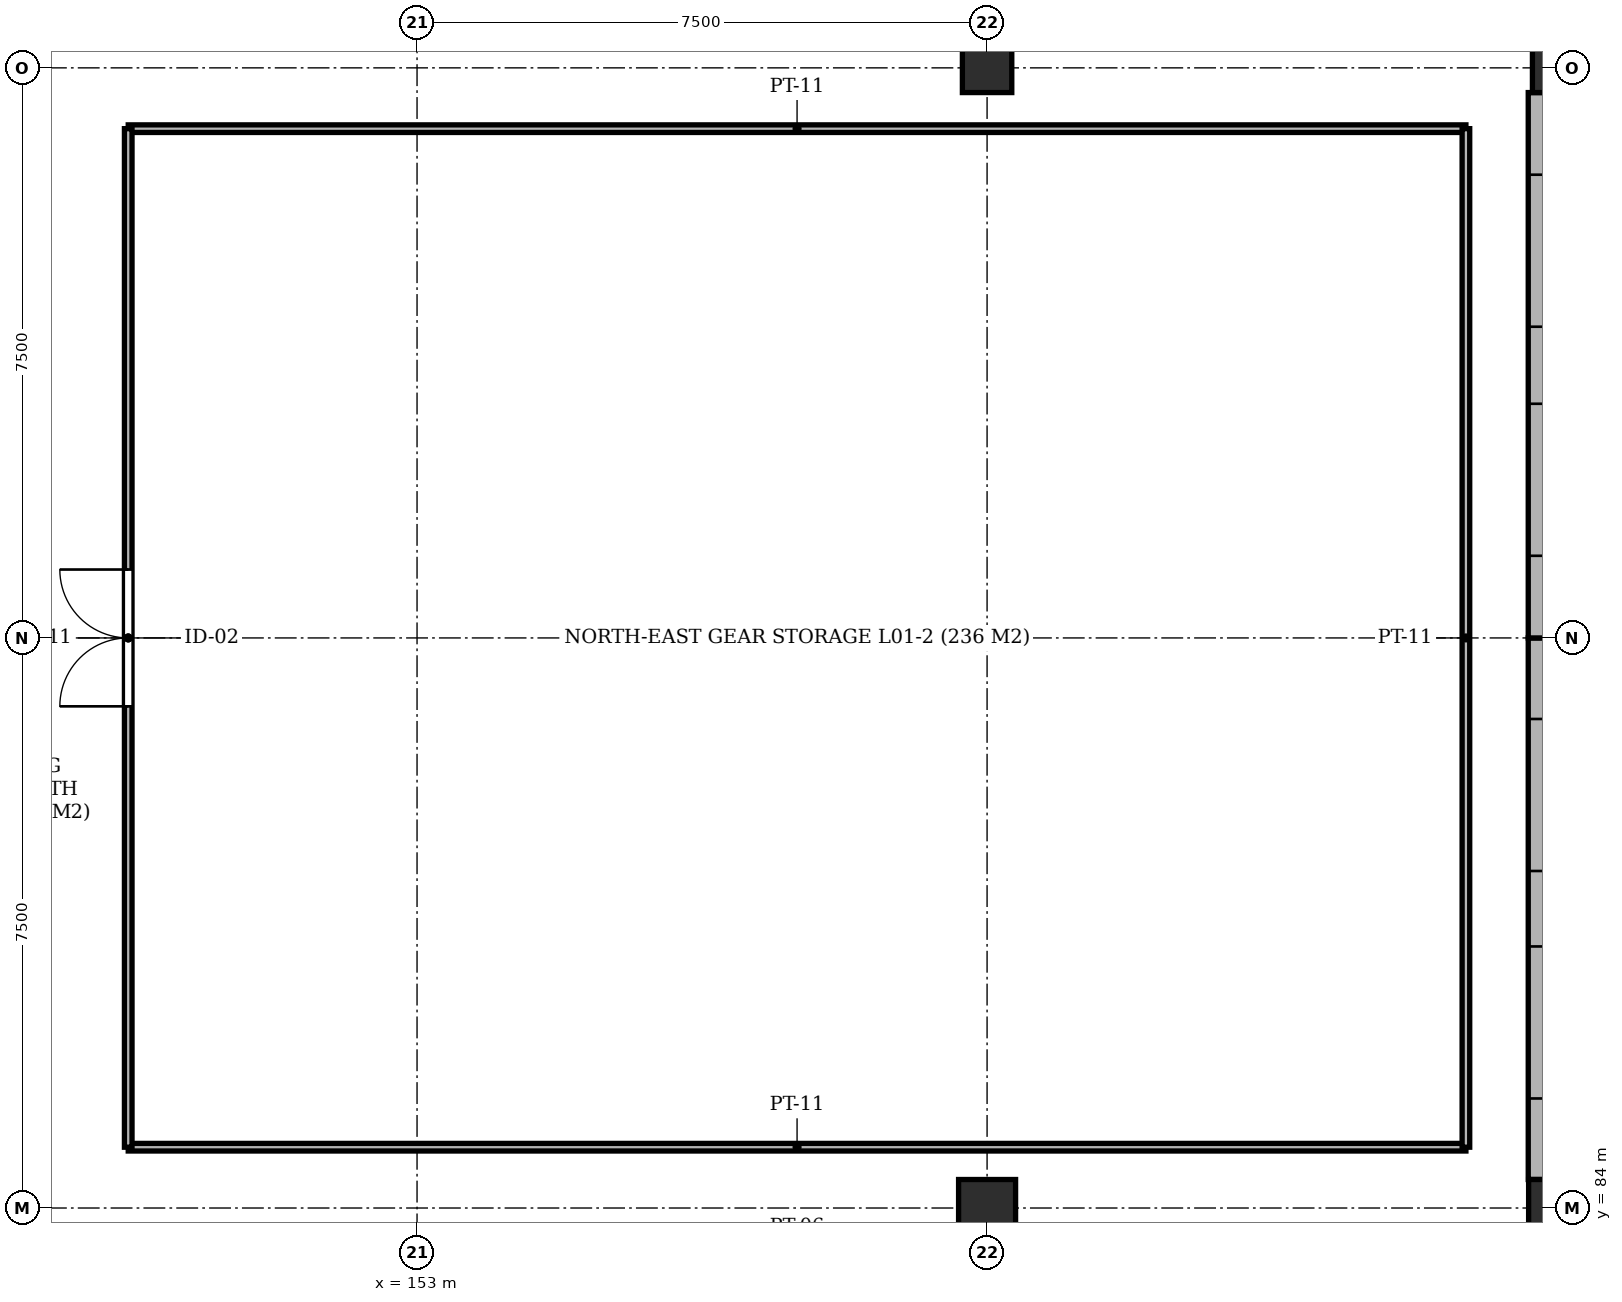
"""IFC4 building model, lengths in metres.
Left out: names, types, materials, properties, quantities, classifications, styles, units other than length and angle.
Written with IfcOpenShell. Run it as: python <this file> out.ifc"""

import sys

from ifc_helpers import new_model, si_unit, direction, frame, frame_2d, origin, origin_2d, place, context, subcontext, project, spatial, rectangle, extrude, element, fill, save


model = new_model("IFC4")
c1 = context("Model", 3, precision=1e-05, world=origin(), true_north=direction((0.0, 1.0)))
c2 = subcontext(c1, "Body", "Model", "MODEL_VIEW")
j1 = project(units=[si_unit("LENGTHUNIT", "METRE"), si_unit("PLANEANGLEUNIT", "RADIAN")], contexts=[c1])
p1 = place(None, origin())
s1 = spatial("IfcSite", under=j1, at=p1, CompositionType="ELEMENT")
p2 = place(p1, origin())
s2 = spatial("IfcBuilding", under=s1, at=p2, CompositionType="ELEMENT")
p3 = place(p2, frame((0.0, 0.0, 4.6)))
s3 = spatial("IfcBuildingStorey", under=s2, at=p3, CompositionType="ELEMENT", Elevation=4.6)
p4 = place(p3, frame((160.5, 84.0, -0.3), z_axis=(0.0, 0.0, 1.0), x_axis=(1.0, 0.0, 0.0)))
e1 = element("IfcColumn", 1, at=p4, inside=s3, PredefinedType="COLUMN", context=c2, shape_type="SweptSolid", body=[
    extrude(rectangle(XDim=0.75, YDim=0.75, at=origin_2d()), origin(), (0.0, 0.0, 1.0), 4.65),
])
p5 = place(p3, frame((160.5, 99.0, -0.3), z_axis=(0.0, 0.0, 1.0), x_axis=(1.0, 0.0, 0.0)))
e2 = element("IfcColumn", 2, at=p5, inside=s3, PredefinedType="COLUMN", context=c2, shape_type="SweptSolid", body=[
    extrude(rectangle(XDim=0.65, YDim=0.65, at=origin_2d()), origin(), (0.0, 0.0, 1.0), 4.65),
])
p6 = place(p3, frame((168.0, 84.0, -0.3), z_axis=(0.0, 0.0, 1.0), x_axis=(1.0, 0.0, 0.0)))
e3 = element("IfcColumn", 3, at=p6, inside=s3, PredefinedType="COLUMN", context=c2, shape_type="SweptSolid", body=[
    extrude(rectangle(XDim=0.75, YDim=0.75, at=origin_2d()), origin(), (0.0, 0.0, 1.0), 4.65),
])
p7 = place(p3, frame((168.0, 99.0, -0.3), z_axis=(0.0, 0.0, 1.0), x_axis=(1.0, 0.0, 0.0)))
e4 = element("IfcColumn", 4, at=p7, inside=s3, PredefinedType="COLUMN", context=c2, shape_type="SweptSolid", body=[
    extrude(rectangle(XDim=0.65, YDim=0.65, at=origin_2d()), origin(), (0.0, 0.0, 1.0), 4.65),
])
p8 = place(p3, frame((167.81, 84.375, 0.0), z_axis=(0.0, 0.0, 1.0), x_axis=(0.0, 1.0, 0.0)))
e5 = element("IfcWall", 5, at=p8, inside=s3, PredefinedType="SOLIDWALL", context=c2, shape_type="SweptSolid", body=[
    extrude(rectangle(XDim=7.125, YDim=0.38, at=frame_2d((3.562, 0.0))), origin(), (0.0, 0.0, 1.0), 3.65),
])
p9 = place(p8, frame((1.066, 0.0, 0.92)))
e6 = element("IfcOpeningElement", 6, at=p9, cuts=e5, PredefinedType="OPENING", context=c2, shape_type="SweptSolid", body=[
    extrude(rectangle(XDim=2.0, YDim=2.3, at=frame_2d((1.0, 1.15))), frame((0.0, 0.202, 0.0), z_axis=(0.0, -1.0, 0.0), x_axis=(1.0, 0.0, 0.0)), (0.0, 0.0, 1.0), 0.404),
])
p10 = place(p8, frame((4.059, 0.0, 0.92)))
e7 = element("IfcOpeningElement", 7, at=p10, cuts=e5, PredefinedType="OPENING", context=c2, shape_type="SweptSolid", body=[
    extrude(rectangle(XDim=2.0, YDim=2.3, at=frame_2d((1.0, 1.15))), frame((0.0, 0.202, 0.0), z_axis=(0.0, -1.0, 0.0), x_axis=(1.0, 0.0, 0.0)), (0.0, 0.0, 1.0), 0.404),
])
p11 = place(p3, frame((167.81, 91.5, 0.0), z_axis=(0.0, 0.0, 1.0), x_axis=(0.0, 1.0, 0.0)))
e8 = element("IfcWall", 8, at=p11, inside=s3, PredefinedType="SOLIDWALL", context=c2, shape_type="SweptSolid", body=[
    extrude(rectangle(XDim=7.175, YDim=0.38, at=frame_2d((3.587, 0.0))), origin(), (0.0, 0.0, 1.0), 3.65),
])
p12 = place(p11, frame((1.081, 0.0, 0.92)))
e9 = element("IfcOpeningElement", 9, at=p12, cuts=e8, PredefinedType="OPENING", context=c2, shape_type="SweptSolid", body=[
    extrude(rectangle(XDim=2.0, YDim=2.3, at=frame_2d((1.0, 1.15))), frame((0.0, 0.202, 0.0), z_axis=(0.0, -1.0, 0.0), x_axis=(1.0, 0.0, 0.0)), (0.0, 0.0, 1.0), 0.404),
])
p13 = place(p11, frame((4.094, 0.0, 0.92)))
e10 = element("IfcOpeningElement", 10, at=p13, cuts=e8, PredefinedType="OPENING", context=c2, shape_type="SweptSolid", body=[
    extrude(rectangle(XDim=2.0, YDim=2.3, at=frame_2d((1.0, 1.15))), frame((0.0, 0.202, 0.0), z_axis=(0.0, -1.0, 0.0), x_axis=(1.0, 0.0, 0.0)), (0.0, 0.0, 1.0), 0.404),
])
for number, where, z_axis, x_axis in (
    (11, (149.2, 84.8, 0.0), (0.0, 0.0, 1.0), (1.0, 0.0, 0.0)),
    (12, (149.2, 98.2, 0.0), (0.0, 0.0, 1.0), (1.0, 0.0, 0.0)),
):
    element("IfcWall", number, at=place(p3, frame(where, z_axis=z_axis, x_axis=x_axis)), inside=s3, PredefinedType="PARTITIONING", context=c2, shape_type="SweptSolid", body=[
        extrude(rectangle(XDim=17.6, YDim=0.1, at=frame_2d((8.8, 0.0))), origin(), (0.0, 0.0, 1.0), 4.08),
    ])
p14 = place(p3, frame((149.2, 84.8, 0.0), z_axis=(0.0, 0.0, 1.0), x_axis=(0.0, 1.0, 0.0)))
e13 = element("IfcWall", 13, at=p14, inside=s3, PredefinedType="PARTITIONING", context=c2, shape_type="SweptSolid", body=[
    extrude(rectangle(XDim=13.4, YDim=0.1, at=frame_2d((6.7, 0.0))), origin(), (0.0, 0.0, 1.0), 4.08),
])
p15 = place(p14, frame((5.8, 0.0, 0.0)))
e14 = element("IfcOpeningElement", 14, at=p15, cuts=e13, PredefinedType="OPENING", context=c2, shape_type="SweptSolid", body=[
    extrude(rectangle(XDim=1.8, YDim=2.25, at=frame_2d((0.9, 1.125))), frame((0.0, 0.062, 0.0), z_axis=(0.0, -1.0, 0.0), x_axis=(1.0, 0.0, 0.0)), (0.0, 0.0, 1.0), 0.124),
])
p16 = place(p3, frame((166.8, 84.8, 0.0), z_axis=(0.0, 0.0, 1.0), x_axis=(0.0, 1.0, 0.0)))
e15 = element("IfcWall", 15, at=p16, inside=s3, PredefinedType="PARTITIONING", context=c2, shape_type="SweptSolid", body=[
    extrude(rectangle(XDim=13.4, YDim=0.1, at=frame_2d((6.7, 0.0))), origin(), (0.0, 0.0, 1.0), 4.08),
])
p17 = place(p9, origin())
e16 = element("IfcWindow", 16, at=p17, inside=s3, PartitioningType="SINGLE_PANEL", PredefinedType="WINDOW", context=c2, shape_type="SweptSolid", body=[
    extrude(rectangle(XDim=2.0, YDim=2.3, at=frame_2d((1.0, 1.15))), frame((0.0, 0.03, 0.0), z_axis=(0.0, -1.0, 0.0), x_axis=(1.0, 0.0, 0.0)), (0.0, 0.0, 1.0), 0.06),
])
fill(e6, e16)
p18 = place(p10, origin())
e17 = element("IfcWindow", 17, at=p18, inside=s3, PartitioningType="SINGLE_PANEL", PredefinedType="WINDOW", context=c2, shape_type="SweptSolid", body=[
    extrude(rectangle(XDim=2.0, YDim=2.3, at=frame_2d((1.0, 1.15))), frame((0.0, 0.03, 0.0), z_axis=(0.0, -1.0, 0.0), x_axis=(1.0, 0.0, 0.0)), (0.0, 0.0, 1.0), 0.06),
])
fill(e7, e17)
p19 = place(p12, origin())
e18 = element("IfcWindow", 18, at=p19, inside=s3, PartitioningType="SINGLE_PANEL", PredefinedType="WINDOW", context=c2, shape_type="SweptSolid", body=[
    extrude(rectangle(XDim=2.0, YDim=2.3, at=frame_2d((1.0, 1.15))), frame((0.0, 0.03, 0.0), z_axis=(0.0, -1.0, 0.0), x_axis=(1.0, 0.0, 0.0)), (0.0, 0.0, 1.0), 0.06),
])
fill(e9, e18)
p20 = place(p13, origin())
e19 = element("IfcWindow", 19, at=p20, inside=s3, PartitioningType="SINGLE_PANEL", PredefinedType="WINDOW", context=c2, shape_type="SweptSolid", body=[
    extrude(rectangle(XDim=2.0, YDim=2.3, at=frame_2d((1.0, 1.15))), frame((0.0, 0.03, 0.0), z_axis=(0.0, -1.0, 0.0), x_axis=(1.0, 0.0, 0.0)), (0.0, 0.0, 1.0), 0.06),
])
fill(e10, e19)
p21 = place(p15, origin())
e20 = element("IfcDoor", 20, at=p21, inside=s3, OperationType="DOUBLE_DOOR_SINGLE_SWING", PredefinedType="DOOR", context=c2, shape_type="SweptSolid", body=[
    extrude(rectangle(XDim=1.8, YDim=2.25, at=frame_2d((0.9, 1.125))), frame((0.0, 0.025, 0.0), z_axis=(0.0, -1.0, 0.0), x_axis=(1.0, 0.0, 0.0)), (0.0, 0.0, 1.0), 0.05),
])
fill(e14, e20)
save(model, sys.argv[1])
